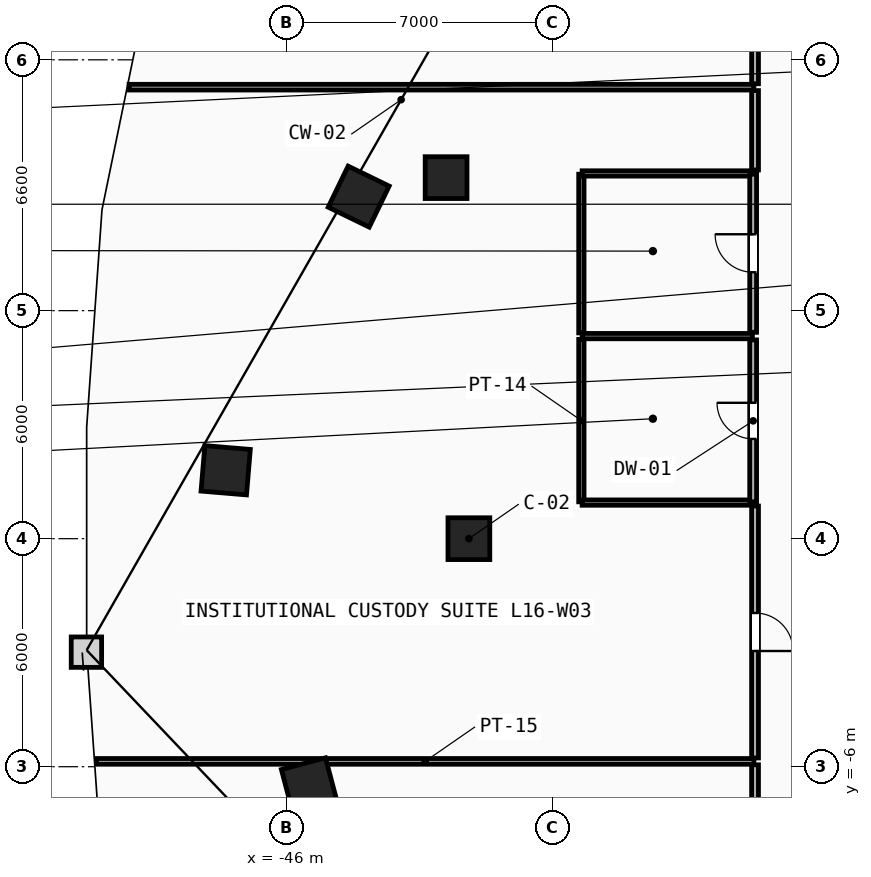
"""IFC4 building model, lengths in metres.
Left out: names, types, materials, properties, quantities, classifications, styles, units other than length and angle.
Written with IfcOpenShell. Run it as: python <this file> out.ifc"""

import sys

from ifc_helpers import new_model, si_unit, direction, frame, frame_2d, origin, origin_2d, place, context, subcontext, project, spatial, rectangle, extrude, element, fill, save


model = new_model("IFC4")
c1 = context("Model", 3, precision=1e-05, world=origin(), true_north=direction((0.0, 1.0)))
c2 = subcontext(c1, "Body", "Model", "MODEL_VIEW")
j1 = project(units=[si_unit("LENGTHUNIT", "METRE"), si_unit("PLANEANGLEUNIT", "RADIAN")], contexts=[c1])
p1 = place(None, origin())
s1 = spatial("IfcSite", under=j1, at=p1, CompositionType="ELEMENT")
p2 = place(p1, origin())
s2 = spatial("IfcBuilding", under=s1, at=p2, CompositionType="ELEMENT")
p3 = place(p2, frame((0.0, 0.0, 65.8)))
s3 = spatial("IfcBuildingStorey", under=s2, at=p3, CompositionType="ELEMENT", Elevation=65.8)
for number, where, z_axis, x_axis in (
    (1, (-41.2, 0.0, 0.0), (0.0, 0.0, 1.0), (1.0, 0.0, 0.0)),
    (2, (-41.8, 9.5, 0.0), (0.0, 0.0, 1.0), (1.0, 0.0, 0.0)),
):
    element("IfcColumn", number, at=place(p3, frame(where, z_axis=z_axis, x_axis=x_axis)), inside=s3, PredefinedType="COLUMN", context=c2, shape_type="SweptSolid", body=[
        extrude(rectangle(XDim=1.1, YDim=1.1, at=origin_2d()), origin(), (0.0, 0.0, 1.0), 3.8),
    ])
for number, where, z_axis, x_axis in (
    (3, (-44.1, 9.0, 0.0), (0.0, 0.0, 1.0), (-0.437, -0.899, 0.0)),
    (4, (-47.6, 1.8, 0.0), (0.0, 0.0, 1.0), (-0.084, -0.997, 0.0)),
    (5, (-45.4, -6.5, 0.0), (0.0, 0.0, 1.0), (0.256, -0.967, 0.0)),
):
    element("IfcColumn", number, at=place(p3, frame(where, z_axis=z_axis, x_axis=x_axis)), inside=s3, PredefinedType="COLUMN", context=c2, shape_type="SweptSolid", body=[
        extrude(rectangle(XDim=1.2, YDim=1.2, at=origin_2d()), origin(), (0.0, 0.0, 1.0), 3.8),
    ])
p4 = place(p3, frame((-38.24, 0.97, 0.0), z_axis=(0.0, 0.0, 1.0), x_axis=(0.0, 1.0, 0.0)))
e6 = element("IfcWall", 6, at=p4, inside=s3, PredefinedType="PARTITIONING", context=c2, shape_type="SweptSolid", body=[
    extrude(rectangle(XDim=4.275, YDim=0.14, at=frame_2d((2.138, 0.0))), origin(), (0.0, 0.0, 1.0), 3.5),
])
p5 = place(p3, frame((-38.24, 5.415, 0.0), z_axis=(0.0, 0.0, 1.0), x_axis=(0.0, 1.0, 0.0)))
e7 = element("IfcWall", 7, at=p5, inside=s3, PredefinedType="PARTITIONING", context=c2, shape_type="SweptSolid", body=[
    extrude(rectangle(XDim=4.175, YDim=0.14, at=frame_2d((2.087, 0.0))), origin(), (0.0, 0.0, 1.0), 3.5),
])
for number, where, z_axis, x_axis in (
    (8, (-38.22, 0.95, 0.0), (0.0, 0.0, 1.0), (1.0, 0.0, 0.0)),
    (9, (-38.22, 5.33, 0.0), (0.0, 0.0, 1.0), (1.0, 0.0, 0.0)),
    (10, (-38.22, 9.61, 0.0), (0.0, 0.0, 1.0), (1.0, 0.0, 0.0)),
):
    element("IfcWall", number, at=place(p3, frame(where, z_axis=z_axis, x_axis=x_axis)), inside=s3, PredefinedType="PARTITIONING", context=c2, shape_type="SweptSolid", body=[
        extrude(rectangle(XDim=4.48, YDim=0.14, at=frame_2d((2.24, 0.0))), origin(), (0.0, 0.0, 1.0), 3.5),
    ])
p6 = place(p3, frame((-33.72, 0.97, 0.0), z_axis=(0.0, 0.0, 1.0), x_axis=(0.0, 1.0, 0.0)))
e11 = element("IfcWall", 11, at=p6, inside=s3, PredefinedType="PARTITIONING", context=c2, shape_type="SweptSolid", body=[
    extrude(rectangle(XDim=4.26, YDim=0.18, at=frame_2d((2.13, 0.0))), origin(), (0.0, 0.0, 1.0), 3.5),
])
p7 = place(p6, frame((1.655, 0.0, 0.0)))
e12 = element("IfcOpeningElement", 12, at=p7, cuts=e11, PredefinedType="OPENING", context=c2, shape_type="SweptSolid", body=[
    extrude(rectangle(XDim=0.95, YDim=2.1, at=frame_2d((0.475, 1.05))), frame((0.0, 0.1, 0.0), z_axis=(0.0, -1.0, 0.0), x_axis=(1.0, 0.0, 0.0)), (0.0, 0.0, 1.0), 0.2),
])
p8 = place(p3, frame((-33.72, 5.43, 0.0), z_axis=(0.0, 0.0, 1.0), x_axis=(0.0, 1.0, 0.0)))
e13 = element("IfcWall", 13, at=p8, inside=s3, PredefinedType="PARTITIONING", context=c2, shape_type="SweptSolid", body=[
    extrude(rectangle(XDim=4.16, YDim=0.18, at=frame_2d((2.08, 0.0))), origin(), (0.0, 0.0, 1.0), 3.5),
])
p9 = place(p8, frame((1.58, 0.0, 0.0)))
e14 = element("IfcOpeningElement", 14, at=p9, cuts=e13, PredefinedType="OPENING", context=c2, shape_type="SweptSolid", body=[
    extrude(rectangle(XDim=1.0, YDim=2.15, at=frame_2d((0.5, 1.075))), frame((0.0, 0.1, 0.0), z_axis=(0.0, -1.0, 0.0), x_axis=(1.0, 0.0, 0.0)), (0.0, 0.0, 1.0), 0.2),
])
p10 = place(p3, frame((-51.002, -5.86, 0.0), z_axis=(0.0, 0.0, 1.0), x_axis=(1.0, 0.0, 0.0)))
e15 = element("IfcWall", 15, at=p10, inside=s3, PredefinedType="PARTITIONING", context=c2, shape_type="SweptSolid", body=[
    extrude(rectangle(XDim=17.302, YDim=0.15, at=frame_2d((8.651, 0.0))), origin(), (0.0, 0.0, 1.0), 3.5),
])
p11 = place(p3, frame((-50.141, 11.88, 0.0), z_axis=(0.0, 0.0, 1.0), x_axis=(1.0, 0.0, 0.0)))
e16 = element("IfcWall", 16, at=p11, inside=s3, PredefinedType="PARTITIONING", context=c2, shape_type="SweptSolid", body=[
    extrude(rectangle(XDim=16.441, YDim=0.15, at=frame_2d((8.22, 0.0))), origin(), (0.0, 0.0, 1.0), 3.5),
])
p12 = place(p3, frame((-33.67, -5.95, 0.0), z_axis=(0.0, 0.0, 1.0), x_axis=(0.0, -1.0, 0.0)))
e17 = element("IfcWall", 17, at=p12, inside=s3, PredefinedType="PARTITIONING", context=c2, shape_type="SweptSolid", body=[
    extrude(rectangle(XDim=5.45, YDim=0.18, at=frame_2d((2.725, 0.0))), origin(), (0.0, 0.0, 1.0), 3.5),
])
p13 = place(p3, frame((-33.67, 0.859, 0.0), z_axis=(0.0, 0.0, 1.0), x_axis=(0.0, -1.0, 0.0)))
e18 = element("IfcWall", 18, at=p13, inside=s3, PredefinedType="PARTITIONING", context=c2, shape_type="SweptSolid", body=[
    extrude(rectangle(XDim=6.629, YDim=0.18, at=frame_2d((3.314, 0.0))), origin(), (0.0, 0.0, 1.0), 3.5),
])
p14 = place(p13, frame((2.814, 0.0, 0.0)))
e19 = element("IfcOpeningElement", 19, at=p14, cuts=e18, PredefinedType="OPENING", context=c2, shape_type="SweptSolid", body=[
    extrude(rectangle(XDim=1.0, YDim=2.15, at=frame_2d((0.5, 1.075))), frame((0.0, 0.1, 0.0), z_axis=(0.0, -1.0, 0.0), x_axis=(1.0, 0.0, 0.0)), (0.0, 0.0, 1.0), 0.2),
])
p15 = place(p3, frame((-33.67, 11.79, 0.0), z_axis=(0.0, 0.0, 1.0), x_axis=(0.0, -1.0, 0.0)))
e20 = element("IfcWall", 20, at=p15, inside=s3, PredefinedType="PARTITIONING", context=c2, shape_type="SweptSolid", body=[
    extrude(rectangle(XDim=2.089, YDim=0.18, at=frame_2d((1.044, 0.0))), origin(), (0.0, 0.0, 1.0), 3.5),
])
p16 = place(p3, frame((-33.67, 17.428, 0.0), z_axis=(0.0, 0.0, 1.0), x_axis=(0.0, -1.0, 0.0)))
e21 = element("IfcWall", 21, at=p16, inside=s3, PredefinedType="PARTITIONING", context=c2, shape_type="SweptSolid", body=[
    extrude(rectangle(XDim=5.458, YDim=0.18, at=frame_2d((2.729, 0.0))), origin(), (0.0, 0.0, 1.0), 3.5),
])
p17 = place(p16, frame((2.229, 0.0, 0.0)))
e22 = element("IfcOpeningElement", 22, at=p17, cuts=e21, PredefinedType="OPENING", context=c2, shape_type="SweptSolid", body=[
    extrude(rectangle(XDim=1.0, YDim=2.15, at=frame_2d((0.5, 1.075))), frame((0.0, 0.1, 0.0), z_axis=(0.0, -1.0, 0.0), x_axis=(1.0, 0.0, 0.0)), (0.0, 0.0, 1.0), 0.2),
])
p18 = place(p14, origin())
e23 = element("IfcDoor", 23, at=p18, inside=s3, OperationType="SINGLE_SWING_RIGHT", PredefinedType="DOOR", context=c2, shape_type="SweptSolid", body=[
    extrude(rectangle(XDim=1.0, YDim=2.15, at=frame_2d((0.5, 1.075))), frame((0.0, 0.025, 0.0), z_axis=(0.0, -1.0, 0.0), x_axis=(1.0, 0.0, 0.0)), (0.0, 0.0, 1.0), 0.05),
])
fill(e19, e23)
p19 = place(p7, origin())
e24 = element("IfcDoor", 24, at=p19, inside=s3, OperationType="SINGLE_SWING_RIGHT", PredefinedType="DOOR", context=c2, shape_type="SweptSolid", body=[
    extrude(rectangle(XDim=0.95, YDim=2.1, at=frame_2d((0.475, 1.05))), frame((0.0, 0.025, 0.0), z_axis=(0.0, -1.0, 0.0), x_axis=(1.0, 0.0, 0.0)), (0.0, 0.0, 1.0), 0.05),
])
fill(e12, e24)
p20 = place(p9, origin())
e25 = element("IfcDoor", 25, at=p20, inside=s3, OperationType="SINGLE_SWING_RIGHT", PredefinedType="DOOR", context=c2, shape_type="SweptSolid", body=[
    extrude(rectangle(XDim=1.0, YDim=2.15, at=frame_2d((0.5, 1.075))), frame((0.0, 0.025, 0.0), z_axis=(0.0, -1.0, 0.0), x_axis=(1.0, 0.0, 0.0)), (0.0, 0.0, 1.0), 0.05),
])
fill(e14, e25)
save(model, sys.argv[1])
